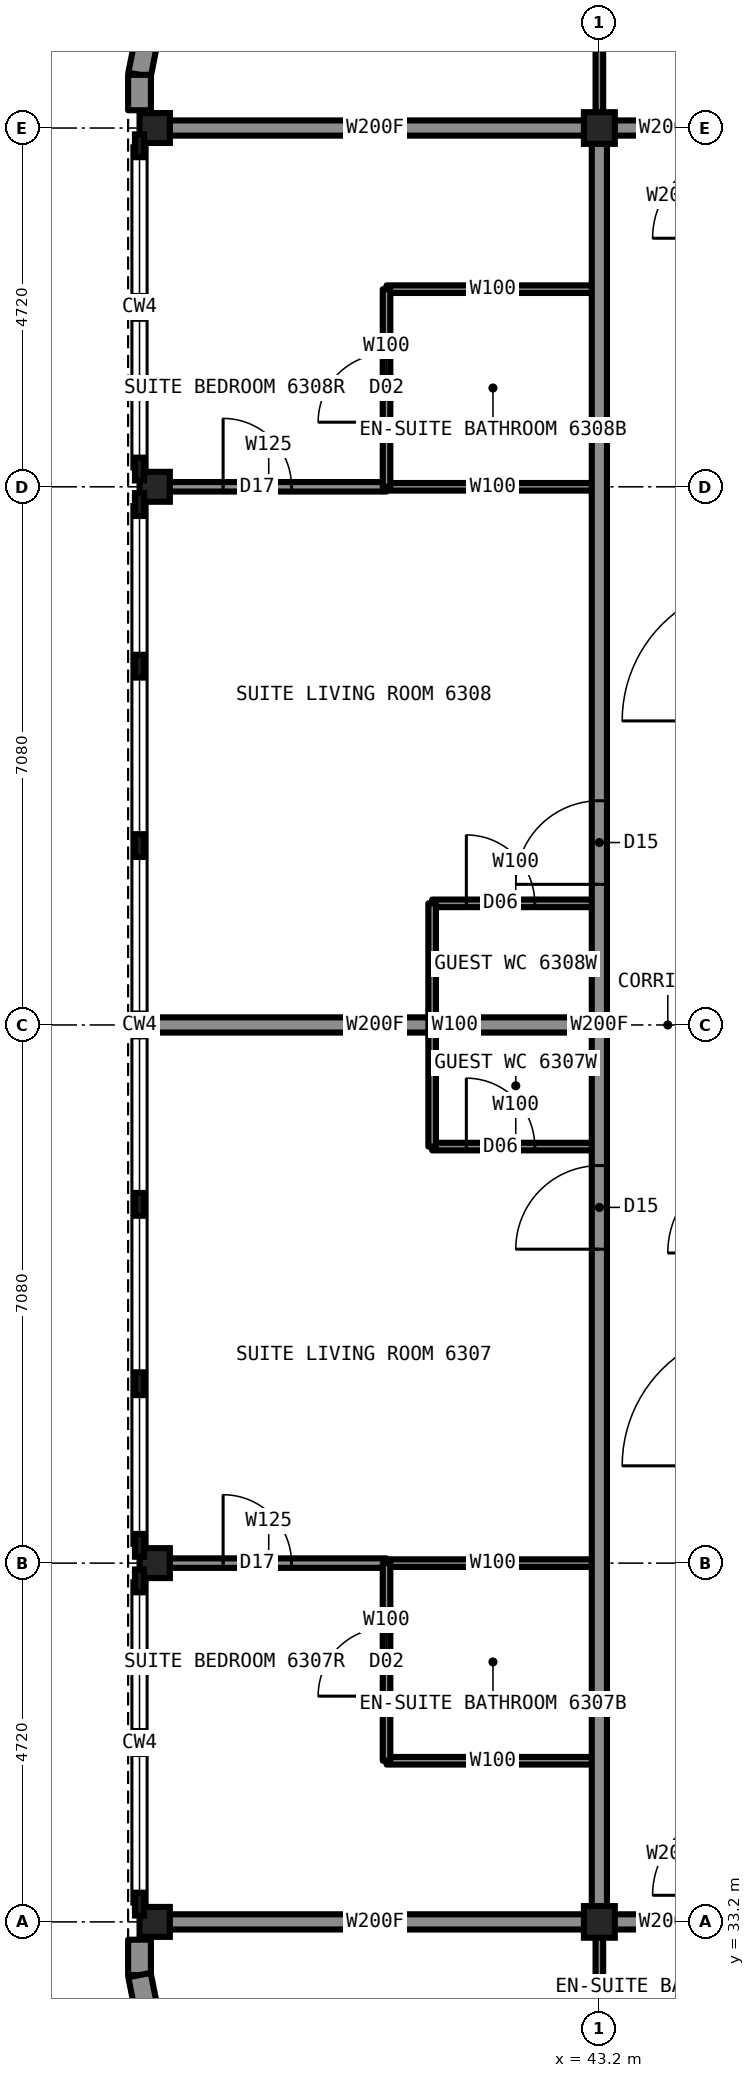
"""IFC4 building model, lengths in metres.
Left out: names, types, materials, properties, quantities, classifications, styles, units other than length and angle.
Written with IfcOpenShell. Run it as: python <this file> out.ifc"""

import sys

from ifc_helpers import new_model, si_unit, direction, frame, frame_2d, origin, origin_2d, place, context, subcontext, project, spatial, rectangle, i_section, extrude, element, fill, save


model = new_model("IFC4")
c1 = context("Model", 3, precision=1e-05, world=origin(), true_north=direction((0.0, 1.0)))
c2 = subcontext(c1, "Body", "Model", "MODEL_VIEW")
j1 = project(units=[si_unit("LENGTHUNIT", "METRE"), si_unit("PLANEANGLEUNIT", "RADIAN")], contexts=[c1])
p1 = place(None, origin())
s1 = spatial("IfcSite", under=j1, at=p1, CompositionType="ELEMENT")
p2 = place(p1, origin())
s2 = spatial("IfcBuilding", under=s1, at=p2, CompositionType="ELEMENT")
p3 = place(p2, frame((0.0, 0.0, 226.7)))
s3 = spatial("IfcBuildingStorey", under=s2, at=p3, CompositionType="ELEMENT", Elevation=226.7)
for number, where, z_axis, x_axis in (
    (1, (37.35, 33.2, 0.0), (0.0, 0.0, 1.0), (1.0, 0.0, 0.0)),
    (2, (37.35, 37.92, 0.0), (0.0, 0.0, 1.0), (1.0, 0.0, 0.0)),
    (3, (37.35, 52.08, 0.0), (0.0, 0.0, 1.0), (1.0, 0.0, 0.0)),
    (4, (37.35, 56.8, 0.0), (0.0, 0.0, 1.0), (1.0, 0.0, 0.0)),
):
    element("IfcColumn", number, at=place(p3, frame(where, z_axis=z_axis, x_axis=x_axis)), inside=s3, PredefinedType="COLUMN", context=c2, shape_type="SweptSolid", body=[
        extrude(i_section(OverallWidth=0.442, OverallDepth=0.531, WebThickness=0.066, FlangeThickness=0.106, at=origin_2d()), origin(), (0.0, 0.0, 1.0), 3.5),
    ])
for number, where, z_axis, x_axis in (
    (5, (43.2, 33.2, 0.0), (0.0, 0.0, 1.0), (1.0, 0.0, 0.0)),
    (6, (43.2, 56.8, 0.0), (0.0, 0.0, 1.0), (1.0, 0.0, 0.0)),
):
    element("IfcColumn", number, at=place(p3, frame(where, z_axis=z_axis, x_axis=x_axis)), inside=s3, PredefinedType="COLUMN", context=c2, shape_type="SweptSolid", body=[
        extrude(i_section(OverallWidth=0.406, OverallDepth=0.417, WebThickness=0.03, FlangeThickness=0.048, at=origin_2d()), origin(), (0.0, 0.0, 1.0), 3.5),
    ])
p4 = place(p3, frame((41.0, 43.4, 0.0), z_axis=(0.0, 0.0, 1.0), x_axis=(1.0, 0.0, 0.0)))
e7 = element("IfcWall", 7, at=p4, inside=s3, PredefinedType="PARTITIONING", context=c2, shape_type="SweptSolid", body=[
    extrude(rectangle(XDim=2.2, YDim=0.1, at=frame_2d((1.1, 0.0))), origin(), (0.0, 0.0, 1.0), 3.33),
])
p5 = place(p4, frame((0.45, 0.0, 0.0)))
e8 = element("IfcOpeningElement", 8, at=p5, cuts=e7, PredefinedType="OPENING", context=c2, shape_type="SweptSolid", body=[
    extrude(rectangle(XDim=0.9, YDim=2.1, at=frame_2d((0.45, 1.05))), frame((0.0, 0.06, 0.0), z_axis=(0.0, -1.0, 0.0), x_axis=(1.0, 0.0, 0.0)), (0.0, 0.0, 1.0), 0.12),
])
p6 = place(p3, frame((43.2, 33.2, 0.0), z_axis=(0.0, 0.0, 1.0), x_axis=(1.0, 0.0, 0.0)))
e9 = element("IfcWall", 9, at=p6, inside=s3, PredefinedType="PARTITIONING", context=c2, shape_type="SweptSolid", body=[
    extrude(rectangle(XDim=1.8, YDim=0.2, at=frame_2d((0.9, 0.0))), origin(), (0.0, 0.0, 1.0), 3.33),
])
p7 = place(p3, frame((37.3, 33.2, 0.0), z_axis=(0.0, 0.0, 1.0), x_axis=(1.0, 0.0, 0.0)))
e10 = element("IfcWall", 10, at=p7, inside=s3, PredefinedType="PARTITIONING", context=c2, shape_type="SweptSolid", body=[
    extrude(rectangle(XDim=5.9, YDim=0.2, at=frame_2d((2.95, 0.0))), origin(), (0.0, 0.0, 1.0), 2.573),
])
p8 = place(p3, frame((40.4, 37.92, 0.0), z_axis=(0.0, 0.0, 1.0), x_axis=(1.0, 0.0, 0.0)))
e11 = element("IfcWall", 11, at=p8, inside=s3, PredefinedType="PARTITIONING", context=c2, shape_type="SweptSolid", body=[
    extrude(rectangle(XDim=2.8, YDim=0.1, at=frame_2d((1.4, 0.0))), origin(), (0.0, 0.0, 1.0), 2.573),
])
p9 = place(p3, frame((37.3, 37.92, 0.0), z_axis=(0.0, 0.0, 1.0), x_axis=(1.0, 0.0, 0.0)))
e12 = element("IfcWall", 12, at=p9, inside=s3, PredefinedType="PARTITIONING", context=c2, shape_type="SweptSolid", body=[
    extrude(rectangle(XDim=3.1, YDim=0.125, at=frame_2d((1.55, 0.0))), origin(), (0.0, 0.0, 1.0), 2.573),
])
p10 = place(p9, frame((0.95, 0.0, 0.0)))
e13 = element("IfcOpeningElement", 13, at=p10, cuts=e12, PredefinedType="OPENING", context=c2, shape_type="SweptSolid", body=[
    extrude(rectangle(XDim=0.9, YDim=2.2, at=frame_2d((0.45, 1.1))), frame((0.0, 0.073, 0.0), z_axis=(0.0, -1.0, 0.0), x_axis=(1.0, 0.0, 0.0)), (0.0, 0.0, 1.0), 0.145),
])
p11 = place(p3, frame((40.4, 35.32, 0.0), z_axis=(0.0, 0.0, 1.0), x_axis=(1.0, 0.0, 0.0)))
e14 = element("IfcWall", 14, at=p11, inside=s3, PredefinedType="PARTITIONING", context=c2, shape_type="SweptSolid", body=[
    extrude(rectangle(XDim=2.8, YDim=0.1, at=frame_2d((1.4, 0.0))), origin(), (0.0, 0.0, 1.0), 3.33),
])
p12 = place(p3, frame((37.3, 45.0, 0.0), z_axis=(0.0, 0.0, 1.0), x_axis=(1.0, 0.0, 0.0)))
e15 = element("IfcWall", 15, at=p12, inside=s3, PredefinedType="PARTITIONING", context=c2, shape_type="SweptSolid", body=[
    extrude(rectangle(XDim=5.9, YDim=0.2, at=frame_2d((2.95, 0.0))), origin(), (0.0, 0.0, 1.0), 2.797),
])
p13 = place(p3, frame((41.0, 46.6, 0.0), z_axis=(0.0, 0.0, 1.0), x_axis=(1.0, 0.0, 0.0)))
e16 = element("IfcWall", 16, at=p13, inside=s3, PredefinedType="PARTITIONING", context=c2, shape_type="SweptSolid", body=[
    extrude(rectangle(XDim=2.2, YDim=0.1, at=frame_2d((1.1, 0.0))), origin(), (0.0, 0.0, 1.0), 3.33),
])
p14 = place(p13, frame((0.45, 0.0, 0.0)))
e17 = element("IfcOpeningElement", 17, at=p14, cuts=e16, PredefinedType="OPENING", context=c2, shape_type="SweptSolid", body=[
    extrude(rectangle(XDim=0.9, YDim=2.1, at=frame_2d((0.45, 1.05))), frame((0.0, 0.06, 0.0), z_axis=(0.0, -1.0, 0.0), x_axis=(1.0, 0.0, 0.0)), (0.0, 0.0, 1.0), 0.12),
])
p15 = place(p3, frame((43.2, 56.8, 0.0), z_axis=(0.0, 0.0, 1.0), x_axis=(1.0, 0.0, 0.0)))
e18 = element("IfcWall", 18, at=p15, inside=s3, PredefinedType="PARTITIONING", context=c2, shape_type="SweptSolid", body=[
    extrude(rectangle(XDim=1.8, YDim=0.2, at=frame_2d((0.9, 0.0))), origin(), (0.0, 0.0, 1.0), 3.33),
])
p16 = place(p3, frame((37.3, 56.8, 0.0), z_axis=(0.0, 0.0, 1.0), x_axis=(1.0, 0.0, 0.0)))
e19 = element("IfcWall", 19, at=p16, inside=s3, PredefinedType="PARTITIONING", context=c2, shape_type="SweptSolid", body=[
    extrude(rectangle(XDim=5.9, YDim=0.2, at=frame_2d((2.95, 0.0))), origin(), (0.0, 0.0, 1.0), 2.573),
])
p17 = place(p3, frame((40.4, 52.08, 0.0), z_axis=(0.0, 0.0, 1.0), x_axis=(1.0, 0.0, 0.0)))
e20 = element("IfcWall", 20, at=p17, inside=s3, PredefinedType="PARTITIONING", context=c2, shape_type="SweptSolid", body=[
    extrude(rectangle(XDim=2.8, YDim=0.1, at=frame_2d((1.4, 0.0))), origin(), (0.0, 0.0, 1.0), 2.573),
])
p18 = place(p3, frame((37.3, 52.08, 0.0), z_axis=(0.0, 0.0, 1.0), x_axis=(1.0, 0.0, 0.0)))
e21 = element("IfcWall", 21, at=p18, inside=s3, PredefinedType="PARTITIONING", context=c2, shape_type="SweptSolid", body=[
    extrude(rectangle(XDim=3.1, YDim=0.125, at=frame_2d((1.55, 0.0))), origin(), (0.0, 0.0, 1.0), 2.573),
])
p19 = place(p18, frame((0.95, 0.0, 0.0)))
e22 = element("IfcOpeningElement", 22, at=p19, cuts=e21, PredefinedType="OPENING", context=c2, shape_type="SweptSolid", body=[
    extrude(rectangle(XDim=0.9, YDim=2.2, at=frame_2d((0.45, 1.1))), frame((0.0, 0.073, 0.0), z_axis=(0.0, -1.0, 0.0), x_axis=(1.0, 0.0, 0.0)), (0.0, 0.0, 1.0), 0.145),
])
p20 = place(p3, frame((40.4, 54.68, 0.0), z_axis=(0.0, 0.0, 1.0), x_axis=(1.0, 0.0, 0.0)))
e23 = element("IfcWall", 23, at=p20, inside=s3, PredefinedType="PARTITIONING", context=c2, shape_type="SweptSolid", body=[
    extrude(rectangle(XDim=2.8, YDim=0.1, at=frame_2d((1.4, 0.0))), origin(), (0.0, 0.0, 1.0), 3.33),
])
for number, where, z_axis, x_axis in (
    (24, (43.2, 30.4, 0.0), (0.0, 0.0, 1.0), (0.0, 1.0, 0.0)),
    (25, (43.2, 56.8, 0.0), (0.0, 0.0, 1.0), (0.0, 1.0, 0.0)),
):
    element("IfcWall", number, at=place(p3, frame(where, z_axis=z_axis, x_axis=x_axis)), inside=s3, PredefinedType="PARTITIONING", context=c2, shape_type="SweptSolid", body=[
        extrude(rectangle(XDim=2.8, YDim=0.1, at=frame_2d((1.4, 0.0))), origin(), (0.0, 0.0, 1.0), 2.573),
    ])
p21 = place(p3, frame((43.2, 33.2, 0.0), z_axis=(0.0, 0.0, 1.0), x_axis=(0.0, 1.0, 0.0)))
e26 = element("IfcWall", 26, at=p21, inside=s3, PredefinedType="PARTITIONING", context=c2, shape_type="SweptSolid", body=[
    extrude(rectangle(XDim=23.6, YDim=0.2, at=frame_2d((11.8, 0.0))), origin(), (0.0, 0.0, 1.0), 3.33),
])
p22 = place(p21, frame((8.85, 0.0, 0.0)))
e27 = element("IfcOpeningElement", 27, at=p22, cuts=e26, PredefinedType="OPENING", context=c2, shape_type="SweptSolid", body=[
    extrude(rectangle(XDim=1.1, YDim=2.2, at=frame_2d((0.55, 1.1))), frame((0.0, 0.11, 0.0), z_axis=(0.0, -1.0, 0.0), x_axis=(1.0, 0.0, 0.0)), (0.0, 0.0, 1.0), 0.22),
])
p23 = place(p21, frame((13.65, 0.0, 0.0)))
e28 = element("IfcOpeningElement", 28, at=p23, cuts=e26, PredefinedType="OPENING", context=c2, shape_type="SweptSolid", body=[
    extrude(rectangle(XDim=1.1, YDim=2.2, at=frame_2d((0.55, 1.1))), frame((0.0, 0.11, 0.0), z_axis=(0.0, -1.0, 0.0), x_axis=(1.0, 0.0, 0.0)), (0.0, 0.0, 1.0), 0.22),
])
p24 = place(p3, frame((41.0, 43.4, 0.0), z_axis=(0.0, 0.0, 1.0), x_axis=(0.0, 1.0, 0.0)))
e29 = element("IfcWall", 29, at=p24, inside=s3, PredefinedType="PARTITIONING", context=c2, shape_type="SweptSolid", body=[
    extrude(rectangle(XDim=3.2, YDim=0.1, at=frame_2d((1.6, 0.0))), origin(), (0.0, 0.0, 1.0), 3.33),
])
p25 = place(p3, frame((40.4, 35.32, 0.0), z_axis=(0.0, 0.0, 1.0), x_axis=(0.0, 1.0, 0.0)))
e30 = element("IfcWall", 30, at=p25, inside=s3, PredefinedType="PARTITIONING", context=c2, shape_type="SweptSolid", body=[
    extrude(rectangle(XDim=2.6, YDim=0.1, at=frame_2d((1.3, 0.0))), origin(), (0.0, 0.0, 1.0), 3.33),
])
p26 = place(p25, frame((0.85, 0.0, 0.0)))
e31 = element("IfcOpeningElement", 31, at=p26, cuts=e30, PredefinedType="OPENING", context=c2, shape_type="SweptSolid", body=[
    extrude(rectangle(XDim=0.9, YDim=2.1, at=frame_2d((0.45, 1.05))), frame((0.0, 0.06, 0.0), z_axis=(0.0, -1.0, 0.0), x_axis=(1.0, 0.0, 0.0)), (0.0, 0.0, 1.0), 0.12),
])
p27 = place(p3, frame((40.4, 52.08, 0.0), z_axis=(0.0, 0.0, 1.0), x_axis=(0.0, 1.0, 0.0)))
e32 = element("IfcWall", 32, at=p27, inside=s3, PredefinedType="PARTITIONING", context=c2, shape_type="SweptSolid", body=[
    extrude(rectangle(XDim=2.6, YDim=0.1, at=frame_2d((1.3, 0.0))), origin(), (0.0, 0.0, 1.0), 3.33),
])
p28 = place(p27, frame((0.85, 0.0, 0.0)))
e33 = element("IfcOpeningElement", 33, at=p28, cuts=e32, PredefinedType="OPENING", context=c2, shape_type="SweptSolid", body=[
    extrude(rectangle(XDim=0.9, YDim=2.1, at=frame_2d((0.45, 1.05))), frame((0.0, 0.06, 0.0), z_axis=(0.0, -1.0, 0.0), x_axis=(1.0, 0.0, 0.0)), (0.0, 0.0, 1.0), 0.12),
])
p29 = place(p22, origin())
e34 = element("IfcDoor", 34, at=p29, inside=s3, OperationType="SINGLE_SWING_LEFT", PredefinedType="DOOR", context=c2, shape_type="SweptSolid", body=[
    extrude(rectangle(XDim=1.1, YDim=2.2, at=frame_2d((0.55, 1.1))), frame((0.0, 0.025, 0.0), z_axis=(0.0, -1.0, 0.0), x_axis=(1.0, 0.0, 0.0)), (0.0, 0.0, 1.0), 0.05),
])
fill(e27, e34)
p30 = place(p26, origin())
e35 = element("IfcDoor", 35, at=p30, inside=s3, OperationType="SINGLE_SWING_RIGHT", PredefinedType="DOOR", context=c2, shape_type="SweptSolid", body=[
    extrude(rectangle(XDim=0.9, YDim=2.1, at=frame_2d((0.45, 1.05))), frame((0.0, 0.025, 0.0), z_axis=(0.0, -1.0, 0.0), x_axis=(1.0, 0.0, 0.0)), (0.0, 0.0, 1.0), 0.05),
])
fill(e31, e35)
p31 = place(p10, origin())
e36 = element("IfcDoor", 36, at=p31, inside=s3, OperationType="SINGLE_SWING_LEFT", PredefinedType="DOOR", context=c2, shape_type="SweptSolid", body=[
    extrude(rectangle(XDim=0.9, YDim=2.2, at=frame_2d((0.45, 1.1))), frame((0.0, 0.025, 0.0), z_axis=(0.0, -1.0, 0.0), x_axis=(1.0, 0.0, 0.0)), (0.0, 0.0, 1.0), 0.05),
])
fill(e13, e36)
p32 = place(p5, origin())
e37 = element("IfcDoor", 37, at=p32, inside=s3, OperationType="SINGLE_SWING_LEFT", PredefinedType="DOOR", context=c2, shape_type="SweptSolid", body=[
    extrude(rectangle(XDim=0.9, YDim=2.1, at=frame_2d((0.45, 1.05))), frame((0.0, 0.025, 0.0), z_axis=(0.0, -1.0, 0.0), x_axis=(1.0, 0.0, 0.0)), (0.0, 0.0, 1.0), 0.05),
])
fill(e8, e37)
p33 = place(p23, origin())
e38 = element("IfcDoor", 38, at=p33, inside=s3, OperationType="SINGLE_SWING_LEFT", PredefinedType="DOOR", context=c2, shape_type="SweptSolid", body=[
    extrude(rectangle(XDim=1.1, YDim=2.2, at=frame_2d((0.55, 1.1))), frame((0.0, 0.025, 0.0), z_axis=(0.0, -1.0, 0.0), x_axis=(1.0, 0.0, 0.0)), (0.0, 0.0, 1.0), 0.05),
])
fill(e28, e38)
p34 = place(p28, origin())
e39 = element("IfcDoor", 39, at=p34, inside=s3, OperationType="SINGLE_SWING_RIGHT", PredefinedType="DOOR", context=c2, shape_type="SweptSolid", body=[
    extrude(rectangle(XDim=0.9, YDim=2.1, at=frame_2d((0.45, 1.05))), frame((0.0, 0.025, 0.0), z_axis=(0.0, -1.0, 0.0), x_axis=(1.0, 0.0, 0.0)), (0.0, 0.0, 1.0), 0.05),
])
fill(e33, e39)
p35 = place(p19, origin())
e40 = element("IfcDoor", 40, at=p35, inside=s3, OperationType="SINGLE_SWING_LEFT", PredefinedType="DOOR", context=c2, shape_type="SweptSolid", body=[
    extrude(rectangle(XDim=0.9, YDim=2.2, at=frame_2d((0.45, 1.1))), frame((0.0, 0.025, 0.0), z_axis=(0.0, -1.0, 0.0), x_axis=(1.0, 0.0, 0.0)), (0.0, 0.0, 1.0), 0.05),
])
fill(e22, e40)
p36 = place(p14, origin())
e41 = element("IfcDoor", 41, at=p36, inside=s3, OperationType="SINGLE_SWING_LEFT", PredefinedType="DOOR", context=c2, shape_type="SweptSolid", body=[
    extrude(rectangle(XDim=0.9, YDim=2.1, at=frame_2d((0.45, 1.05))), frame((0.0, 0.025, 0.0), z_axis=(0.0, -1.0, 0.0), x_axis=(1.0, 0.0, 0.0)), (0.0, 0.0, 1.0), 0.05),
])
fill(e17, e41)
save(model, sys.argv[1])
